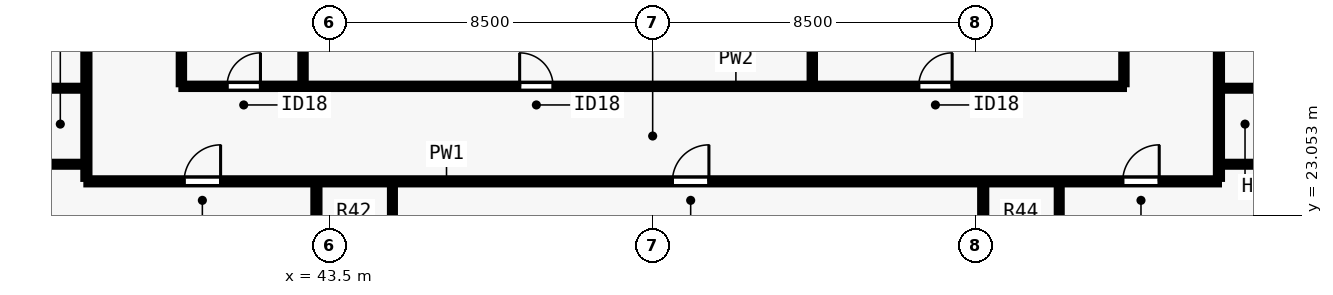
"""IFC4 building model, lengths in metres.
Left out: names, types, materials, properties, quantities, classifications, styles, units other than length and angle.
Written with IfcOpenShell. Run it as: python <this file> out.ifc"""

import sys

from ifc_helpers import new_model, si_unit, direction, frame, frame_2d, origin, place, context, subcontext, project, spatial, rectangle, extrude, element, fill, save


model = new_model("IFC4")
c1 = context("Model", 3, precision=1e-05, world=origin(), true_north=direction((0.0, 1.0)))
c2 = subcontext(c1, "Body", "Model", "MODEL_VIEW")
j1 = project(units=[si_unit("LENGTHUNIT", "METRE"), si_unit("PLANEANGLEUNIT", "RADIAN")], contexts=[c1])
p1 = place(None, origin())
s1 = spatial("IfcSite", under=j1, at=p1, CompositionType="ELEMENT")
p2 = place(p1, origin())
s2 = spatial("IfcBuilding", under=s1, at=p2, CompositionType="ELEMENT")
p3 = place(p2, frame((0.0, 0.0, 86.5)))
s3 = spatial("IfcBuildingStorey", under=s2, at=p3, CompositionType="ELEMENT", Elevation=86.5)
p4 = place(p3, frame((37.1, 23.95, 0.0), z_axis=(0.0, 0.0, 1.0), x_axis=(1.0, 0.0, 0.0)))
e1 = element("IfcWall", 1, at=p4, inside=s3, PredefinedType="PARTITIONING", context=c2, shape_type="SweptSolid", body=[
    extrude(rectangle(XDim=29.8, YDim=0.16, at=frame_2d((14.9, 0.0))), origin(), (0.0, 0.0, 1.0), 3.28),
])
p5 = place(p4, frame((2.571, 0.0, 0.0)))
e2 = element("IfcOpeningElement", 2, at=p5, cuts=e1, PredefinedType="OPENING", context=c2, shape_type="SweptSolid", body=[
    extrude(rectangle(XDim=0.96, YDim=2.15, at=frame_2d((0.48, 1.075))), frame((0.0, 0.09, 0.0), z_axis=(0.0, -1.0, 0.0), x_axis=(1.0, 0.0, 0.0)), (0.0, 0.0, 1.0), 0.18),
])
p6 = place(p4, frame((15.42, 0.0, 0.0)))
e3 = element("IfcOpeningElement", 3, at=p6, cuts=e1, PredefinedType="OPENING", context=c2, shape_type="SweptSolid", body=[
    extrude(rectangle(XDim=0.96, YDim=2.15, at=frame_2d((0.48, 1.075))), frame((0.0, 0.09, 0.0), z_axis=(0.0, -1.0, 0.0), x_axis=(1.0, 0.0, 0.0)), (0.0, 0.0, 1.0), 0.18),
])
p7 = place(p4, frame((27.269, 0.0, 0.0)))
e4 = element("IfcOpeningElement", 4, at=p7, cuts=e1, PredefinedType="OPENING", context=c2, shape_type="SweptSolid", body=[
    extrude(rectangle(XDim=0.96, YDim=2.15, at=frame_2d((0.48, 1.075))), frame((0.0, 0.09, 0.0), z_axis=(0.0, -1.0, 0.0), x_axis=(1.0, 0.0, 0.0)), (0.0, 0.0, 1.0), 0.18),
])
p8 = place(p3, frame((37.1, 24.015, 0.0), z_axis=(0.0, 0.0, 1.0), x_axis=(0.0, 1.0, 0.0)))
e5 = element("IfcWall", 5, at=p8, inside=s3, PredefinedType="PARTITIONING", context=c2, shape_type="SweptSolid", body=[
    extrude(rectangle(XDim=29.97, YDim=0.16, at=frame_2d((14.985, 0.0))), origin(), (0.0, 0.0, 1.0), 3.28),
])
p9 = place(p8, frame((8.134, 0.0, 0.0)))
e6 = element("IfcOpeningElement", 6, at=p9, cuts=e5, PredefinedType="OPENING", context=c2, shape_type="SweptSolid", body=[
    extrude(rectangle(XDim=0.96, YDim=2.15, at=frame_2d((0.48, 1.075))), frame((0.0, 0.09, 0.0), z_axis=(0.0, -1.0, 0.0), x_axis=(1.0, 0.0, 0.0)), (0.0, 0.0, 1.0), 0.18),
])
p10 = place(p8, frame((22.934, 0.0, 0.0)))
e7 = element("IfcOpeningElement", 7, at=p10, cuts=e5, PredefinedType="OPENING", context=c2, shape_type="SweptSolid", body=[
    extrude(rectangle(XDim=0.96, YDim=2.15, at=frame_2d((0.48, 1.075))), frame((0.0, 0.09, 0.0), z_axis=(0.0, -1.0, 0.0), x_axis=(1.0, 0.0, 0.0)), (0.0, 0.0, 1.0), 0.18),
])
p11 = place(p3, frame((66.9, 24.015, 0.0), z_axis=(0.0, 0.0, 1.0), x_axis=(0.0, 1.0, 0.0)))
e8 = element("IfcWall", 8, at=p11, inside=s3, PredefinedType="PARTITIONING", context=c2, shape_type="SweptSolid", body=[
    extrude(rectangle(XDim=29.97, YDim=0.16, at=frame_2d((14.985, 0.0))), origin(), (0.0, 0.0, 1.0), 3.28),
])
p12 = place(p11, frame((3.911, 0.0, 0.0)))
e9 = element("IfcOpeningElement", 9, at=p12, cuts=e8, PredefinedType="OPENING", context=c2, shape_type="SweptSolid", body=[
    extrude(rectangle(XDim=0.96, YDim=2.15, at=frame_2d((0.48, 1.075))), frame((0.0, 0.09, 0.0), z_axis=(0.0, -1.0, 0.0), x_axis=(1.0, 0.0, 0.0)), (0.0, 0.0, 1.0), 0.18),
])
p13 = place(p11, frame((9.544, 0.0, 0.0)))
e10 = element("IfcOpeningElement", 10, at=p13, cuts=e8, PredefinedType="OPENING", context=c2, shape_type="SweptSolid", body=[
    extrude(rectangle(XDim=0.96, YDim=2.15, at=frame_2d((0.48, 1.075))), frame((0.0, 0.09, 0.0), z_axis=(0.0, -1.0, 0.0), x_axis=(1.0, 0.0, 0.0)), (0.0, 0.0, 1.0), 0.18),
])
p14 = place(p11, frame((15.625, 0.0, 0.0)))
e11 = element("IfcOpeningElement", 11, at=p14, cuts=e8, PredefinedType="OPENING", context=c2, shape_type="SweptSolid", body=[
    extrude(rectangle(XDim=0.96, YDim=2.15, at=frame_2d((0.48, 1.075))), frame((0.0, 0.09, 0.0), z_axis=(0.0, -1.0, 0.0), x_axis=(1.0, 0.0, 0.0)), (0.0, 0.0, 1.0), 0.18),
])
p15 = place(p11, frame((21.584, 0.0, 0.0)))
e12 = element("IfcOpeningElement", 12, at=p15, cuts=e8, PredefinedType="OPENING", context=c2, shape_type="SweptSolid", body=[
    extrude(rectangle(XDim=0.96, YDim=2.15, at=frame_2d((0.48, 1.075))), frame((0.0, 0.09, 0.0), z_axis=(0.0, -1.0, 0.0), x_axis=(1.0, 0.0, 0.0)), (0.0, 0.0, 1.0), 0.18),
])
p16 = place(p11, frame((27.494, 0.0, 0.0)))
e13 = element("IfcOpeningElement", 13, at=p16, cuts=e8, PredefinedType="OPENING", context=c2, shape_type="SweptSolid", body=[
    extrude(rectangle(XDim=0.96, YDim=2.15, at=frame_2d((0.48, 1.075))), frame((0.0, 0.09, 0.0), z_axis=(0.0, -1.0, 0.0), x_axis=(1.0, 0.0, 0.0)), (0.0, 0.0, 1.0), 0.18),
])
p17 = place(p3, frame((39.6, 26.45, 0.0), z_axis=(0.0, 0.0, 1.0), x_axis=(1.0, 0.0, 0.0)))
e14 = element("IfcWall", 14, at=p17, inside=s3, PredefinedType="PARTITIONING", context=c2, shape_type="SweptSolid", body=[
    extrude(rectangle(XDim=24.8, YDim=0.14, at=frame_2d((12.4, 0.0))), origin(), (0.0, 0.0, 1.0), 3.28),
])
p18 = place(p17, frame((1.2, 0.0, 0.0)))
e15 = element("IfcOpeningElement", 15, at=p18, cuts=e14, PredefinedType="OPENING", context=c2, shape_type="SweptSolid", body=[
    extrude(rectangle(XDim=0.88, YDim=2.1, at=frame_2d((0.44, 1.05))), frame((0.0, 0.08, 0.0), z_axis=(0.0, -1.0, 0.0), x_axis=(1.0, 0.0, 0.0)), (0.0, 0.0, 1.0), 0.16),
])
p19 = place(p17, frame((8.9, 0.0, 0.0)))
e16 = element("IfcOpeningElement", 16, at=p19, cuts=e14, PredefinedType="OPENING", context=c2, shape_type="SweptSolid", body=[
    extrude(rectangle(XDim=0.88, YDim=2.1, at=frame_2d((0.44, 1.05))), frame((0.0, 0.08, 0.0), z_axis=(0.0, -1.0, 0.0), x_axis=(1.0, 0.0, 0.0)), (0.0, 0.0, 1.0), 0.16),
])
p20 = place(p17, frame((19.4, 0.0, 0.0)))
e17 = element("IfcOpeningElement", 17, at=p20, cuts=e14, PredefinedType="OPENING", context=c2, shape_type="SweptSolid", body=[
    extrude(rectangle(XDim=0.88, YDim=2.1, at=frame_2d((0.44, 1.05))), frame((0.0, 0.08, 0.0), z_axis=(0.0, -1.0, 0.0), x_axis=(1.0, 0.0, 0.0)), (0.0, 0.0, 1.0), 0.16),
])
p21 = place(p3, frame((39.6, 26.505, 0.0), z_axis=(0.0, 0.0, 1.0), x_axis=(0.0, 1.0, 0.0)))
e18 = element("IfcWall", 18, at=p21, inside=s3, PredefinedType="PARTITIONING", context=c2, shape_type="SweptSolid", body=[
    extrude(rectangle(XDim=12.245, YDim=0.14, at=frame_2d((6.123, 0.0))), origin(), (0.0, 0.0, 1.0), 3.28),
])
p22 = place(p21, frame((1.045, 0.0, 0.0)))
e19 = element("IfcOpeningElement", 19, at=p22, cuts=e18, PredefinedType="OPENING", context=c2, shape_type="SweptSolid", body=[
    extrude(rectangle(XDim=0.88, YDim=2.1, at=frame_2d((0.44, 1.05))), frame((0.0, 0.08, 0.0), z_axis=(0.0, -1.0, 0.0), x_axis=(1.0, 0.0, 0.0)), (0.0, 0.0, 1.0), 0.16),
])
p23 = place(p21, frame((9.295, 0.0, 0.0)))
e20 = element("IfcOpeningElement", 20, at=p23, cuts=e18, PredefinedType="OPENING", context=c2, shape_type="SweptSolid", body=[
    extrude(rectangle(XDim=0.88, YDim=2.1, at=frame_2d((0.44, 1.05))), frame((0.0, 0.08, 0.0), z_axis=(0.0, -1.0, 0.0), x_axis=(1.0, 0.0, 0.0)), (0.0, 0.0, 1.0), 0.16),
])
p24 = place(p3, frame((64.4, 26.505, 0.0), z_axis=(0.0, 0.0, 1.0), x_axis=(0.0, 1.0, 0.0)))
e21 = element("IfcWall", 21, at=p24, inside=s3, PredefinedType="PARTITIONING", context=c2, shape_type="SweptSolid", body=[
    extrude(rectangle(XDim=12.245, YDim=0.14, at=frame_2d((6.123, 0.0))), origin(), (0.0, 0.0, 1.0), 3.28),
])
p25 = place(p24, frame((2.445, 0.0, 0.0)))
e22 = element("IfcOpeningElement", 22, at=p25, cuts=e21, PredefinedType="OPENING", context=c2, shape_type="SweptSolid", body=[
    extrude(rectangle(XDim=0.88, YDim=2.1, at=frame_2d((0.44, 1.05))), frame((0.0, 0.08, 0.0), z_axis=(0.0, -1.0, 0.0), x_axis=(1.0, 0.0, 0.0)), (0.0, 0.0, 1.0), 0.16),
])
p26 = place(p3, frame((42.8, 26.505, 0.0), z_axis=(0.0, 0.0, 1.0), x_axis=(0.0, 1.0, 0.0)))
e23 = element("IfcWall", 23, at=p26, inside=s3, PredefinedType="PARTITIONING", context=c2, shape_type="SweptSolid", body=[
    extrude(rectangle(XDim=3.995, YDim=0.14, at=frame_2d((1.998, 0.0))), origin(), (0.0, 0.0, 1.0), 2.439),
])
p27 = place(p3, frame((56.2, 26.505, 0.0), z_axis=(0.0, 0.0, 1.0), x_axis=(0.0, 1.0, 0.0)))
e24 = element("IfcWall", 24, at=p27, inside=s3, PredefinedType="PARTITIONING", context=c2, shape_type="SweptSolid", body=[
    extrude(rectangle(XDim=3.735, YDim=0.14, at=frame_2d((1.868, 0.0))), origin(), (0.0, 0.0, 1.0), 2.849),
])
p28 = place(p3, frame((43.153, 13.845, 0.0), z_axis=(0.0, 0.0, 1.0), x_axis=(0.0, 1.0, 0.0)))
e25 = element("IfcWall", 25, at=p28, inside=s3, PredefinedType="PARTITIONING", context=c2, shape_type="SweptSolid", body=[
    extrude(rectangle(XDim=10.04, YDim=0.16, at=frame_2d((5.02, 0.0))), origin(), (0.0, 0.0, 1.0), 3.28),
])
p29 = place(p3, frame((45.153, 21.65, 0.0), z_axis=(0.0, 0.0, 1.0), x_axis=(0.0, 1.0, 0.0)))
e26 = element("IfcWall", 26, at=p29, inside=s3, PredefinedType="PLUMBINGWALL", context=c2, shape_type="SweptSolid", body=[
    extrude(rectangle(XDim=2.235, YDim=0.13, at=frame_2d((1.118, 0.0))), origin(), (0.0, 0.0, 1.0), 3.28),
])
p30 = place(p3, frame((60.698, 13.845, 0.0), z_axis=(0.0, 0.0, 1.0), x_axis=(0.0, 1.0, 0.0)))
e27 = element("IfcWall", 27, at=p30, inside=s3, PredefinedType="PARTITIONING", context=c2, shape_type="SweptSolid", body=[
    extrude(rectangle(XDim=10.04, YDim=0.16, at=frame_2d((5.02, 0.0))), origin(), (0.0, 0.0, 1.0), 3.28),
])
p31 = place(p3, frame((62.698, 21.65, 0.0), z_axis=(0.0, 0.0, 1.0), x_axis=(0.0, 1.0, 0.0)))
e28 = element("IfcWall", 28, at=p31, inside=s3, PredefinedType="PLUMBINGWALL", context=c2, shape_type="SweptSolid", body=[
    extrude(rectangle(XDim=2.235, YDim=0.13, at=frame_2d((1.118, 0.0))), origin(), (0.0, 0.0, 1.0), 3.28),
])
p32 = place(p3, frame((34.8, 24.4, 0.0), z_axis=(0.0, 0.0, 1.0), x_axis=(1.0, 0.0, 0.0)))
e29 = element("IfcWall", 29, at=p32, inside=s3, PredefinedType="PLUMBINGWALL", context=c2, shape_type="SweptSolid", body=[
    extrude(rectangle(XDim=2.235, YDim=0.13, at=frame_2d((1.117, 0.0))), origin(), (0.0, 0.0, 1.0), 2.849),
])
p33 = place(p3, frame((34.8, 26.4, 0.0), z_axis=(0.0, 0.0, 1.0), x_axis=(1.0, 0.0, 0.0)))
e30 = element("IfcWall", 30, at=p33, inside=s3, PredefinedType="PLUMBINGWALL", context=c2, shape_type="SweptSolid", body=[
    extrude(rectangle(XDim=2.235, YDim=0.13, at=frame_2d((1.117, 0.0))), origin(), (0.0, 0.0, 1.0), 3.28),
])
p34 = place(p3, frame((66.965, 24.4, 0.0), z_axis=(0.0, 0.0, 1.0), x_axis=(1.0, 0.0, 0.0)))
e31 = element("IfcWall", 31, at=p34, inside=s3, PredefinedType="PLUMBINGWALL", context=c2, shape_type="SweptSolid", body=[
    extrude(rectangle(XDim=2.235, YDim=0.13, at=frame_2d((1.117, 0.0))), origin(), (0.0, 0.0, 1.0), 2.849),
])
p35 = place(p3, frame((66.965, 26.4, 0.0), z_axis=(0.0, 0.0, 1.0), x_axis=(1.0, 0.0, 0.0)))
e32 = element("IfcWall", 32, at=p35, inside=s3, PredefinedType="PLUMBINGWALL", context=c2, shape_type="SweptSolid", body=[
    extrude(rectangle(XDim=2.235, YDim=0.13, at=frame_2d((1.117, 0.0))), origin(), (0.0, 0.0, 1.0), 3.28),
])
p36 = place(p18, origin())
e33 = element("IfcDoor", 33, at=p36, inside=s3, OperationType="SINGLE_SWING_RIGHT", PredefinedType="DOOR", context=c2, shape_type="SweptSolid", body=[
    extrude(rectangle(XDim=0.88, YDim=2.1, at=frame_2d((0.44, 1.05))), frame((0.0, 0.025, 0.0), z_axis=(0.0, -1.0, 0.0), x_axis=(1.0, 0.0, 0.0)), (0.0, 0.0, 1.0), 0.05),
])
fill(e15, e33)
p37 = place(p19, origin())
e34 = element("IfcDoor", 34, at=p37, inside=s3, OperationType="SINGLE_SWING_LEFT", PredefinedType="DOOR", context=c2, shape_type="SweptSolid", body=[
    extrude(rectangle(XDim=0.88, YDim=2.1, at=frame_2d((0.44, 1.05))), frame((0.0, 0.025, 0.0), z_axis=(0.0, -1.0, 0.0), x_axis=(1.0, 0.0, 0.0)), (0.0, 0.0, 1.0), 0.05),
])
fill(e16, e34)
p38 = place(p20, origin())
e35 = element("IfcDoor", 35, at=p38, inside=s3, OperationType="SINGLE_SWING_RIGHT", PredefinedType="DOOR", context=c2, shape_type="SweptSolid", body=[
    extrude(rectangle(XDim=0.88, YDim=2.1, at=frame_2d((0.44, 1.05))), frame((0.0, 0.025, 0.0), z_axis=(0.0, -1.0, 0.0), x_axis=(1.0, 0.0, 0.0)), (0.0, 0.0, 1.0), 0.05),
])
fill(e17, e35)
p39 = place(p5, origin())
e36 = element("IfcDoor", 36, at=p39, inside=s3, OperationType="SINGLE_SWING_RIGHT", PredefinedType="DOOR", context=c2, shape_type="SweptSolid", body=[
    extrude(rectangle(XDim=0.96, YDim=2.15, at=frame_2d((0.48, 1.075))), frame((0.0, 0.025, 0.0), z_axis=(0.0, -1.0, 0.0), x_axis=(1.0, 0.0, 0.0)), (0.0, 0.0, 1.0), 0.05),
])
fill(e2, e36)
p40 = place(p6, origin())
e37 = element("IfcDoor", 37, at=p40, inside=s3, OperationType="SINGLE_SWING_RIGHT", PredefinedType="DOOR", context=c2, shape_type="SweptSolid", body=[
    extrude(rectangle(XDim=0.96, YDim=2.15, at=frame_2d((0.48, 1.075))), frame((0.0, 0.025, 0.0), z_axis=(0.0, -1.0, 0.0), x_axis=(1.0, 0.0, 0.0)), (0.0, 0.0, 1.0), 0.05),
])
fill(e3, e37)
p41 = place(p7, origin())
e38 = element("IfcDoor", 38, at=p41, inside=s3, OperationType="SINGLE_SWING_RIGHT", PredefinedType="DOOR", context=c2, shape_type="SweptSolid", body=[
    extrude(rectangle(XDim=0.96, YDim=2.15, at=frame_2d((0.48, 1.075))), frame((0.0, 0.025, 0.0), z_axis=(0.0, -1.0, 0.0), x_axis=(1.0, 0.0, 0.0)), (0.0, 0.0, 1.0), 0.05),
])
fill(e4, e38)
save(model, sys.argv[1])
